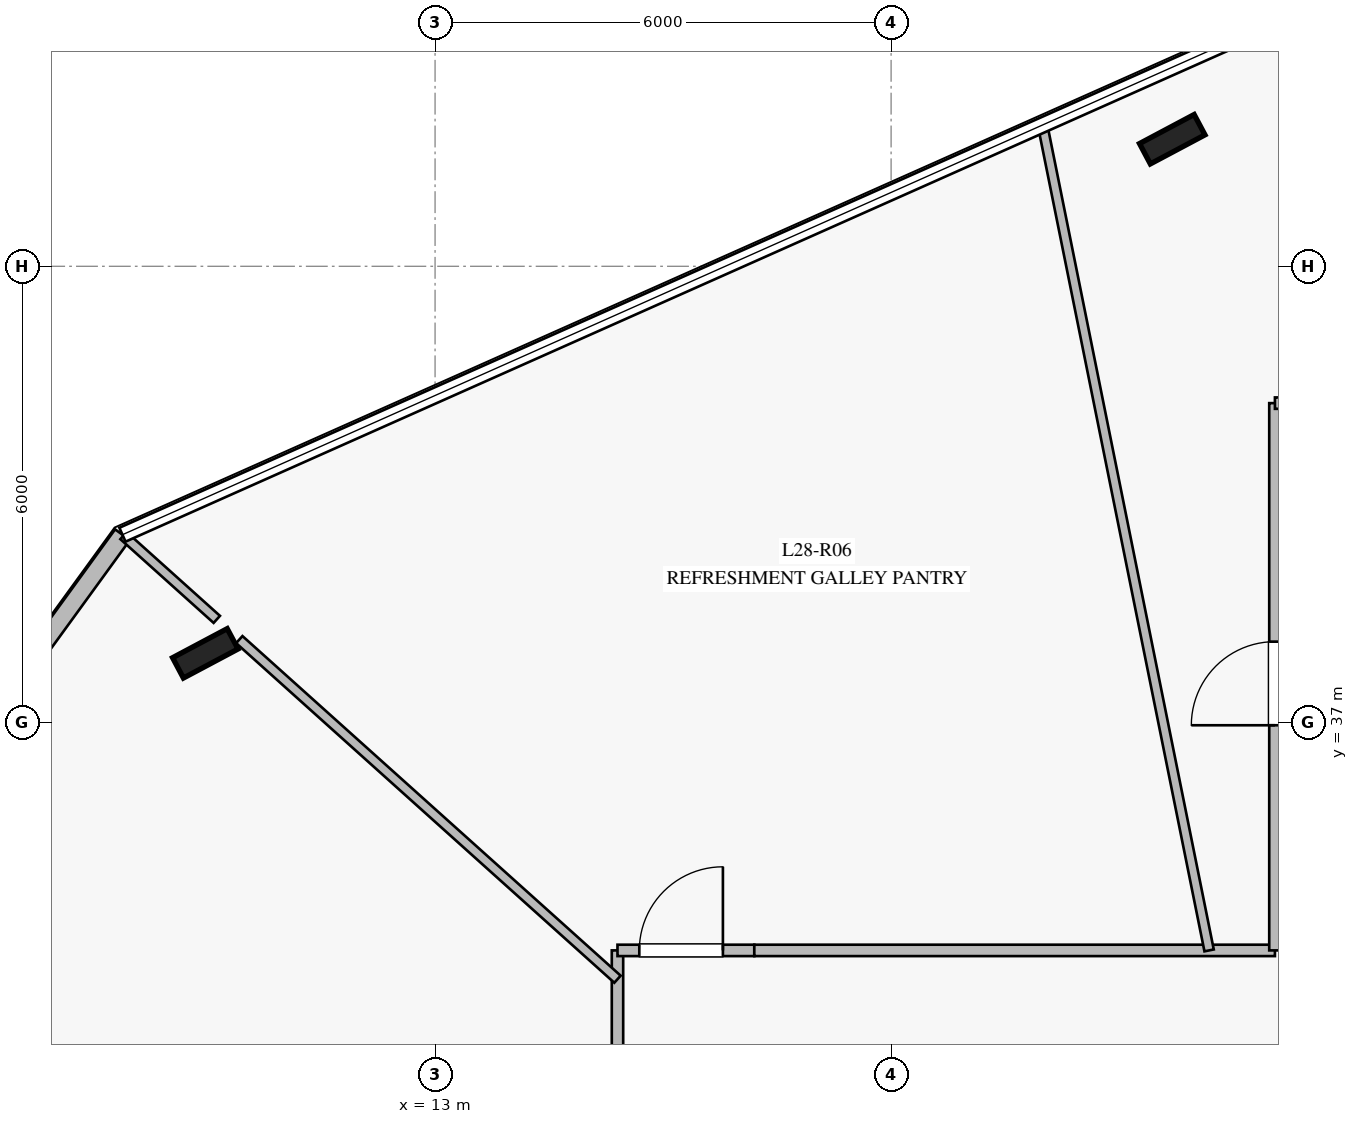
"""IFC4 building model, lengths in metres.
Left out: names, types, materials, properties, quantities, classifications, styles, units other than length and angle.
Written with IfcOpenShell. Run it as: python <this file> out.ifc"""

import sys

from ifc_helpers import new_model, si_unit, direction, frame, frame_2d, origin, origin_2d, place, context, subcontext, project, spatial, rectangle, i_section, extrude, element, fill, save


model = new_model("IFC4")
c1 = context("Model", 3, precision=1e-05, world=origin(), true_north=direction((0.0, 1.0)))
c2 = subcontext(c1, "Body", "Model", "MODEL_VIEW")
j1 = project(units=[si_unit("LENGTHUNIT", "METRE"), si_unit("PLANEANGLEUNIT", "RADIAN")], contexts=[c1])
p1 = place(None, origin())
s1 = spatial("IfcSite", under=j1, at=p1, CompositionType="ELEMENT")
p2 = place(p1, origin())
s2 = spatial("IfcBuilding", under=s1, at=p2, CompositionType="ELEMENT")
p3 = place(p2, frame((0.0, 0.0, 118.4)))
s3 = spatial("IfcBuildingStorey", under=s2, at=p3, CompositionType="ELEMENT", Elevation=118.4)
for number, where, z_axis, x_axis in (
    (1, (22.699, 44.672, 0.0), (0.0, 0.0, 1.0), (0.883, 0.469, 0.0)),
    (2, (9.977, 37.908, 0.0), (0.0, 0.0, 1.0), (0.883, 0.469, 0.0)),
):
    element("IfcColumn", number, at=place(p3, frame(where, z_axis=z_axis, x_axis=x_axis)), inside=s3, PredefinedType="COLUMN", context=c2, shape_type="SweptSolid", body=[
        extrude(i_section(OverallWidth=0.303, OverallDepth=0.814, WebThickness=0.021, FlangeThickness=0.04, at=origin_2d()), origin(), (0.0, 0.0, 1.0), 4.0),
    ])
p4 = place(p3, frame((8.887, 39.469, 0.0), z_axis=(0.0, 0.0, 1.0), x_axis=(-0.587898873753, -0.80893443136, 0.0)))
e3 = element("IfcWall", 3, at=p4, inside=s3, PredefinedType="STANDARD", context=c2, shape_type="SweptSolid", body=[
    extrude(rectangle(XDim=4.47, YDim=0.24, at=frame_2d((2.235, 0.0))), origin(), (0.0, 0.0, 1.0), 3.76),
])
p5 = place(p3, frame((15.4, 32.2, 0.0), z_axis=(0.0, 0.0, 1.0), x_axis=(0.0, 1.0, 0.0)))
e4 = element("IfcWall", 4, at=p5, inside=s3, PredefinedType="PARTITIONING", context=c2, shape_type="SweptSolid", body=[
    extrude(rectangle(XDim=1.8, YDim=0.15, at=frame_2d((0.9, 0.0))), origin(), (0.0, 0.0, 1.0), 3.21),
])
p6 = place(p3, frame((15.4, 34.0, 0.0), z_axis=(0.0, 0.0, 1.0), x_axis=(1.0, 0.0, 0.0)))
e5 = element("IfcWall", 5, at=p6, inside=s3, PredefinedType="PARTITIONING", context=c2, shape_type="SweptSolid", body=[
    extrude(rectangle(XDim=1.8, YDim=0.15, at=frame_2d((0.9, 0.0))), origin(), (0.0, 0.0, 1.0), 3.76),
])
p7 = place(p6, frame((0.287, 0.0, 0.0)))
e6 = element("IfcOpeningElement", 6, at=p7, cuts=e5, PredefinedType="OPENING", context=c2, shape_type="SweptSolid", body=[
    extrude(rectangle(XDim=1.1, YDim=2.2, at=frame_2d((0.55, 1.1))), frame((0.0, 0.085, 0.0), z_axis=(0.0, -1.0, 0.0), x_axis=(1.0, 0.0, 0.0)), (0.0, 0.0, 1.0), 0.17),
])
p8 = place(p3, frame((17.2, 34.0, 0.0), z_axis=(0.0, 0.0, 1.0), x_axis=(1.0, 0.0, 0.0)))
e7 = element("IfcWall", 7, at=p8, inside=s3, PredefinedType="PARTITIONING", context=c2, shape_type="SweptSolid", body=[
    extrude(rectangle(XDim=6.85, YDim=0.15, at=frame_2d((3.425, 0.0))), origin(), (0.0, 0.0, 1.0), 3.21),
])
p9 = place(p3, frame((24.05, 34.0, 0.0), z_axis=(0.0, 0.0, 1.0), x_axis=(0.0, 1.0, 0.0)))
e8 = element("IfcWall", 8, at=p9, inside=s3, PredefinedType="PARTITIONING", context=c2, shape_type="SweptSolid", body=[
    extrude(rectangle(XDim=7.2, YDim=0.15, at=frame_2d((3.6, 0.0))), origin(), (0.0, 0.0, 1.0), 3.36),
])
p10 = place(p9, frame((2.962, 0.0, 0.0)))
e9 = element("IfcOpeningElement", 9, at=p10, cuts=e8, PredefinedType="OPENING", context=c2, shape_type="SweptSolid", body=[
    extrude(rectangle(XDim=1.1, YDim=2.2, at=frame_2d((0.55, 1.1))), frame((0.0, 0.085, 0.0), z_axis=(0.0, -1.0, 0.0), x_axis=(1.0, 0.0, 0.0)), (0.0, 0.0, 1.0), 0.17),
])
p11 = place(p3, frame((24.05, 41.2, 0.0), z_axis=(0.0, 0.0, 1.0), x_axis=(1.0, 0.0, 0.0)))
e10 = element("IfcWall", 10, at=p11, inside=s3, PredefinedType="PARTITIONING", context=c2, shape_type="SweptSolid", body=[
    extrude(rectangle(XDim=1.9, YDim=0.15, at=frame_2d((0.95, 0.0))), origin(), (0.0, 0.0, 1.0), 3.76),
])
p12 = place(p3, frame((23.184, 34.0, 0.0), z_axis=(0.0, 0.0, 1.0), x_axis=(-0.197818005652, 0.980238765118, 0.0)))
e11 = element("IfcWall", 11, at=p12, inside=s3, PredefinedType="PARTITIONING", context=c2, shape_type="SweptSolid", body=[
    extrude(rectangle(XDim=11.061, YDim=0.125, at=frame_2d((5.53, 0.0))), origin(), (0.0, 0.0, 1.0), 3.16),
])
p13 = place(p3, frame((15.4, 33.621, 0.0), z_axis=(0.0, 0.0, 1.0), x_axis=(-0.744054267137, 0.668119186639, 0.0)))
e12 = element("IfcWall", 12, at=p13, inside=s3, PredefinedType="PARTITIONING", context=c2, shape_type="SweptSolid", body=[
    extrude(rectangle(XDim=6.688, YDim=0.125, at=frame_2d((3.344, 0.0))), origin(), (0.0, 0.0, 1.0), 3.16),
])
p14 = place(p3, frame((10.128, 38.355, 0.0), z_axis=(0.0, 0.0, 1.0), x_axis=(-0.743985633598, 0.668195612826, 0.0)))
e13 = element("IfcWall", 13, at=p14, inside=s3, PredefinedType="PARTITIONING", context=c2, shape_type="SweptSolid", body=[
    extrude(rectangle(XDim=1.649, YDim=0.125, at=frame_2d((0.825, 0.0))), origin(), (0.0, 0.0, 1.0), 3.76),
])
p15 = place(p10, origin())
e14 = element("IfcDoor", 14, at=p15, inside=s3, OperationType="SINGLE_SWING_LEFT", PredefinedType="DOOR", context=c2, shape_type="SweptSolid", body=[
    extrude(rectangle(XDim=1.1, YDim=2.2, at=frame_2d((0.55, 1.1))), frame((0.0, 0.025, 0.0), z_axis=(0.0, -1.0, 0.0), x_axis=(1.0, 0.0, 0.0)), (0.0, 0.0, 1.0), 0.05),
])
fill(e9, e14)
p16 = place(p7, origin())
e15 = element("IfcDoor", 15, at=p16, inside=s3, OperationType="SINGLE_SWING_RIGHT", PredefinedType="DOOR", context=c2, shape_type="SweptSolid", body=[
    extrude(rectangle(XDim=1.1, YDim=2.2, at=frame_2d((0.55, 1.1))), frame((0.0, 0.025, 0.0), z_axis=(0.0, -1.0, 0.0), x_axis=(1.0, 0.0, 0.0)), (0.0, 0.0, 1.0), 0.05),
])
fill(e6, e15)
save(model, sys.argv[1])
